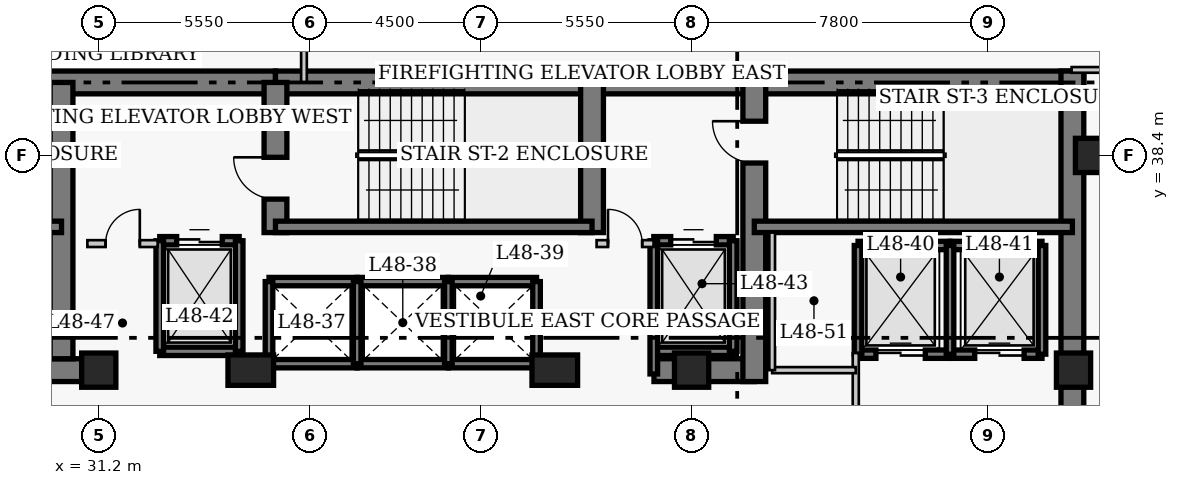
"""IFC4 building model, lengths in metres.
Left out: names, types, materials, properties, quantities, classifications, styles, units other than length and angle.
Written with IfcOpenShell. Run it as: python <this file> out.ifc"""

import sys

from ifc_helpers import new_model, si_unit, direction, frame, frame_2d, origin, origin_2d, place, context, subcontext, project, spatial, rectangle, extrude, element, fill, save


model = new_model("IFC4")
c1 = context("Model", 3, precision=1e-05, world=origin(), true_north=direction((0.0, 1.0)))
c2 = subcontext(c1, "Body", "Model", "MODEL_VIEW")
j1 = project(units=[si_unit("LENGTHUNIT", "METRE"), si_unit("PLANEANGLEUNIT", "RADIAN")], contexts=[c1])
p1 = place(None, origin())
s1 = spatial("IfcSite", under=j1, at=p1, CompositionType="ELEMENT")
p2 = place(p1, origin())
s2 = spatial("IfcBuilding", under=s1, at=p2, CompositionType="ELEMENT")
p3 = place(p2, frame((0.0, 0.0, 192.9)))
s3 = spatial("IfcBuildingStorey", under=s2, at=p3, CompositionType="ELEMENT", Elevation=192.9)
p4 = place(p3, frame((21.6, 40.32, 0.0), z_axis=(0.0, 0.0, 1.0), x_axis=(1.0, 0.0, 0.0)))
e1 = element("IfcWall", 1, at=p4, inside=s3, PredefinedType="SHEAR", context=c2, shape_type="SweptSolid", body=[
    extrude(rectangle(XDim=14.25, YDim=0.6, at=frame_2d((7.125, 0.0))), origin(), (0.0, 0.0, 1.0), 3.9),
])
p5 = place(p3, frame((35.85, 40.32, 0.0), z_axis=(0.0, 0.0, 1.0), x_axis=(1.0, 0.0, 0.0)))
e2 = element("IfcWall", 2, at=p5, inside=s3, PredefinedType="SHEAR", context=c2, shape_type="SweptSolid", body=[
    extrude(rectangle(XDim=12.6, YDim=0.6, at=frame_2d((6.3, 0.0))), origin(), (0.0, 0.0, 1.0), 3.9),
])
p6 = place(p3, frame((48.45, 40.32, 0.0), z_axis=(0.0, 0.0, 1.0), x_axis=(1.0, 0.0, 0.0)))
e3 = element("IfcWall", 3, at=p6, inside=s3, PredefinedType="SHEAR", context=c2, shape_type="SweptSolid", body=[
    extrude(rectangle(XDim=8.67, YDim=0.6, at=frame_2d((4.335, 0.0))), origin(), (0.0, 0.0, 1.0), 3.9),
])
p7 = place(p3, frame((56.82, 27.05, 0.0), z_axis=(0.0, 0.0, 1.0), x_axis=(0.0, 1.0, 0.0)))
e4 = element("IfcWall", 4, at=p7, inside=s3, PredefinedType="SHEAR", context=c2, shape_type="SweptSolid", body=[
    extrude(rectangle(XDim=13.57, YDim=0.6, at=frame_2d((6.785, 0.0))), origin(), (0.0, 0.0, 1.0), 3.9),
])
p8 = place(p3, frame((28.45, 32.75, 0.0), z_axis=(0.0, 0.0, 1.0), x_axis=(1.0, 0.0, 0.0)))
e5 = element("IfcWall", 5, at=p8, inside=s3, PredefinedType="SHEAR", context=c2, shape_type="SweptSolid", body=[
    extrude(rectangle(XDim=2.4, YDim=0.6, at=frame_2d((1.2, 0.0))), origin(), (0.0, 0.0, 1.0), 3.9),
])
p9 = place(p3, frame((45.81, 32.75, 0.0), z_axis=(0.0, 0.0, 1.0), x_axis=(1.0, 0.0, 0.0)))
e6 = element("IfcWall", 6, at=p9, inside=s3, PredefinedType="SHEAR", context=c2, shape_type="SweptSolid", body=[
    extrude(rectangle(XDim=2.64, YDim=0.6, at=frame_2d((1.32, 0.0))), origin(), (0.0, 0.0, 1.0), 3.9),
])
p10 = place(p3, frame((30.22, 33.05, 0.0), z_axis=(0.0, 0.0, 1.0), x_axis=(0.0, 1.0, 0.0)))
e7 = element("IfcWall", 7, at=p10, inside=s3, PredefinedType="SHEAR", context=c2, shape_type="SweptSolid", body=[
    extrude(rectangle(XDim=7.27, YDim=0.6, at=frame_2d((3.635, 0.0))), origin(), (0.0, 0.0, 1.0), 3.9),
])
p11 = place(p3, frame((35.85, 36.37, 0.0), z_axis=(0.0, 0.0, 1.0), x_axis=(0.0, 1.0, 0.0)))
e8 = element("IfcWall", 8, at=p11, inside=s3, PredefinedType="SHEAR", context=c2, shape_type="SweptSolid", body=[
    extrude(rectangle(XDim=3.95, YDim=0.6, at=frame_2d((1.975, 0.0))), origin(), (0.0, 0.0, 1.0), 3.9),
])
p12 = place(p11, frame((0.88, 0.0, 0.0)))
e9 = element("IfcOpeningElement", 9, at=p12, cuts=e8, PredefinedType="OPENING", context=c2, shape_type="SweptSolid", body=[
    extrude(rectangle(XDim=1.1, YDim=2.15, at=frame_2d((0.55, 1.075))), frame((0.0, 0.31, 0.0), z_axis=(0.0, -1.0, 0.0), x_axis=(1.0, 0.0, 0.0)), (0.0, 0.0, 1.0), 0.62),
])
p13 = place(p3, frame((44.18, 36.37, 0.0), z_axis=(0.0, 0.0, 1.0), x_axis=(0.0, 1.0, 0.0)))
e10 = element("IfcWall", 10, at=p13, inside=s3, PredefinedType="SHEAR", context=c2, shape_type="SweptSolid", body=[
    extrude(rectangle(XDim=3.95, YDim=0.6, at=frame_2d((1.975, 0.0))), origin(), (0.0, 0.0, 1.0), 3.9),
])
p14 = place(p3, frame((48.45, 32.45, 0.0), z_axis=(0.0, 0.0, 1.0), x_axis=(0.0, 1.0, 0.0)))
e11 = element("IfcWall", 11, at=p14, inside=s3, PredefinedType="SHEAR", context=c2, shape_type="SweptSolid", body=[
    extrude(rectangle(XDim=7.87, YDim=0.6, at=frame_2d((3.935, 0.0))), origin(), (0.0, 0.0, 1.0), 3.9),
])
p15 = place(p14, frame((5.75, 0.0, 0.0)))
e12 = element("IfcOpeningElement", 12, at=p15, cuts=e11, PredefinedType="OPENING", context=c2, shape_type="SweptSolid", body=[
    extrude(rectangle(XDim=1.1, YDim=2.15, at=frame_2d((0.55, 1.075))), frame((0.0, 0.31, 0.0), z_axis=(0.0, -1.0, 0.0), x_axis=(1.0, 0.0, 0.0)), (0.0, 0.0, 1.0), 0.62),
])
p16 = place(p3, frame((21.9, 36.52, 0.0), z_axis=(0.0, 0.0, 1.0), x_axis=(1.0, 0.0, 0.0)))
e13 = element("IfcWall", 13, at=p16, inside=s3, PredefinedType="SHEAR", context=c2, shape_type="SweptSolid", body=[
    extrude(rectangle(XDim=8.32, YDim=0.3, at=frame_2d((4.16, 0.0))), origin(), (0.0, 0.0, 1.0), 3.9),
])
p17 = place(p16, frame((0.9, 0.0, 0.0)))
e14 = element("IfcOpeningElement", 14, at=p17, cuts=e13, PredefinedType="OPENING", context=c2, shape_type="SweptSolid", body=[
    extrude(rectangle(XDim=1.1, YDim=2.15, at=frame_2d((0.55, 1.075))), frame((0.0, 0.16, 0.0), z_axis=(0.0, -1.0, 0.0), x_axis=(1.0, 0.0, 0.0)), (0.0, 0.0, 1.0), 0.32),
])
p18 = place(p3, frame((35.85, 36.52, 0.0), z_axis=(0.0, 0.0, 1.0), x_axis=(1.0, 0.0, 0.0)))
e15 = element("IfcWall", 15, at=p18, inside=s3, PredefinedType="SHEAR", context=c2, shape_type="SweptSolid", body=[
    extrude(rectangle(XDim=8.33, YDim=0.3, at=frame_2d((4.165, 0.0))), origin(), (0.0, 0.0, 1.0), 3.9),
])
p19 = place(p3, frame((48.45, 36.52, 0.0), z_axis=(0.0, 0.0, 1.0), x_axis=(1.0, 0.0, 0.0)))
e16 = element("IfcWall", 16, at=p19, inside=s3, PredefinedType="SHEAR", context=c2, shape_type="SweptSolid", body=[
    extrude(rectangle(XDim=8.37, YDim=0.3, at=frame_2d((4.185, 0.0))), origin(), (0.0, 0.0, 1.0), 3.9),
])
for number, where, z_axis, x_axis in (
    (17, (57.35, 38.4, 0.0), (0.0, 0.0, 1.0), (1.0, 0.0, 0.0)),
    (18, (31.2, 32.75, 0.0), (0.0, 0.0, 1.0), (1.0, 0.0, 0.0)),
):
    element("IfcColumn", number, at=place(p3, frame(where, z_axis=z_axis, x_axis=x_axis)), inside=s3, PredefinedType="COLUMN", context=c2, shape_type="SweptSolid", body=[
        extrude(rectangle(XDim=0.9, YDim=0.9, at=origin_2d()), origin(), (0.0, 0.0, 1.0), 3.9),
    ])
for number, where, z_axis, x_axis in (
    (19, (35.2, 32.75, 0.0), (0.0, 0.0, 1.0), (1.0, 0.0, 0.0)),
    (20, (43.2, 32.75, 0.0), (0.0, 0.0, 1.0), (1.0, 0.0, 0.0)),
):
    element("IfcColumn", number, at=place(p3, frame(where, z_axis=z_axis, x_axis=x_axis)), inside=s3, PredefinedType="COLUMN", context=c2, shape_type="SweptSolid", body=[
        extrude(rectangle(XDim=1.2, YDim=0.8, at=origin_2d()), origin(), (0.0, 0.0, 1.0), 3.9),
    ])
for number, where, z_axis, x_axis in (
    (21, (46.8, 32.75, 0.0), (0.0, 0.0, 1.0), (1.0, 0.0, 0.0)),
    (22, (56.85, 32.75, 0.0), (0.0, 0.0, 1.0), (1.0, 0.0, 0.0)),
):
    element("IfcColumn", number, at=place(p3, frame(where, z_axis=z_axis, x_axis=x_axis)), inside=s3, PredefinedType="COLUMN", context=c2, shape_type="SweptSolid", body=[
        extrude(rectangle(XDim=0.9, YDim=0.9, at=origin_2d()), origin(), (0.0, 0.0, 1.0), 3.9),
    ])
for number, where, z_axis, x_axis in (
    (23, (35.68, 35.08, 0.0), (0.0, 0.0, 1.0), (1.0, 0.0, 0.0)),
    (24, (35.68, 32.92, 0.0), (0.0, 0.0, 1.0), (1.0, 0.0, 0.0)),
):
    element("IfcWall", number, at=place(p3, frame(where, z_axis=z_axis, x_axis=x_axis)), inside=s3, PredefinedType="SHEAR", context=c2, shape_type="SweptSolid", body=[
        extrude(rectangle(XDim=2.32, YDim=0.22, at=frame_2d((1.16, 0.0))), origin(), (0.0, 0.0, 1.0), 3.9),
    ])
p20 = place(p3, frame((35.68, 32.92, 0.0), z_axis=(0.0, 0.0, 1.0), x_axis=(0.0, 1.0, 0.0)))
e25 = element("IfcWall", 25, at=p20, inside=s3, PredefinedType="SHEAR", context=c2, shape_type="SweptSolid", body=[
    extrude(rectangle(XDim=2.16, YDim=0.2, at=frame_2d((1.08, 0.0))), origin(), (0.0, 0.0, 1.0), 3.9),
])
for number, where, z_axis, x_axis in (
    (26, (38.0, 35.08, 0.0), (0.0, 0.0, 1.0), (1.0, 0.0, 0.0)),
    (27, (38.0, 32.92, 0.0), (0.0, 0.0, 1.0), (1.0, 0.0, 0.0)),
):
    element("IfcWall", number, at=place(p3, frame(where, z_axis=z_axis, x_axis=x_axis)), inside=s3, PredefinedType="SHEAR", context=c2, shape_type="SweptSolid", body=[
        extrude(rectangle(XDim=2.4, YDim=0.22, at=frame_2d((1.2, 0.0))), origin(), (0.0, 0.0, 1.0), 3.9),
    ])
p21 = place(p3, frame((38.0, 32.92, 0.0), z_axis=(0.0, 0.0, 1.0), x_axis=(0.0, 1.0, 0.0)))
e28 = element("IfcWall", 28, at=p21, inside=s3, PredefinedType="SHEAR", context=c2, shape_type="SweptSolid", body=[
    extrude(rectangle(XDim=2.16, YDim=0.2, at=frame_2d((1.08, 0.0))), origin(), (0.0, 0.0, 1.0), 3.9),
])
for number, where, z_axis, x_axis in (
    (29, (40.4, 35.08, 0.0), (0.0, 0.0, 1.0), (1.0, 0.0, 0.0)),
    (30, (40.4, 32.92, 0.0), (0.0, 0.0, 1.0), (1.0, 0.0, 0.0)),
):
    element("IfcWall", number, at=place(p3, frame(where, z_axis=z_axis, x_axis=x_axis)), inside=s3, PredefinedType="SHEAR", context=c2, shape_type="SweptSolid", body=[
        extrude(rectangle(XDim=2.32, YDim=0.22, at=frame_2d((1.16, 0.0))), origin(), (0.0, 0.0, 1.0), 3.9),
    ])
for number, where, z_axis, x_axis in (
    (31, (40.4, 32.92, 0.0), (0.0, 0.0, 1.0), (0.0, 1.0, 0.0)),
    (32, (42.72, 32.92, 0.0), (0.0, 0.0, 1.0), (0.0, 1.0, 0.0)),
):
    element("IfcWall", number, at=place(p3, frame(where, z_axis=z_axis, x_axis=x_axis)), inside=s3, PredefinedType="SHEAR", context=c2, shape_type="SweptSolid", body=[
        extrude(rectangle(XDim=2.16, YDim=0.2, at=frame_2d((1.08, 0.0))), origin(), (0.0, 0.0, 1.0), 3.9),
    ])
p22 = place(p3, frame((51.18, 36.03, 0.0), z_axis=(0.0, 0.0, 1.0), x_axis=(1.0, 0.0, 0.0)))
e33 = element("IfcWall", 33, at=p22, inside=s3, PredefinedType="SHEAR", context=c2, shape_type="SweptSolid", body=[
    extrude(rectangle(XDim=2.42, YDim=0.22, at=frame_2d((1.21, 0.0))), origin(), (0.0, 0.0, 1.0), 3.9),
])
p23 = place(p3, frame((51.18, 33.17, 0.0), z_axis=(0.0, 0.0, 1.0), x_axis=(1.0, 0.0, 0.0)))
e34 = element("IfcWall", 34, at=p23, inside=s3, PredefinedType="SHEAR", context=c2, shape_type="SweptSolid", body=[
    extrude(rectangle(XDim=2.42, YDim=0.22, at=frame_2d((1.21, 0.0))), origin(), (0.0, 0.0, 1.0), 3.9),
])
p24 = place(p23, frame((0.47, 0.0, 0.0)))
e35 = element("IfcOpeningElement", 35, at=p24, cuts=e34, PredefinedType="OPENING", context=c2, shape_type="SweptSolid", body=[
    extrude(rectangle(XDim=1.3, YDim=2.15, at=frame_2d((0.65, 1.075))), frame((0.0, 0.12, 0.0), z_axis=(0.0, -1.0, 0.0), x_axis=(1.0, 0.0, 0.0)), (0.0, 0.0, 1.0), 0.24),
])
p25 = place(p3, frame((51.18, 33.17, 0.0), z_axis=(0.0, 0.0, 1.0), x_axis=(0.0, 1.0, 0.0)))
e36 = element("IfcWall", 36, at=p25, inside=s3, PredefinedType="SHEAR", context=c2, shape_type="SweptSolid", body=[
    extrude(rectangle(XDim=2.86, YDim=0.2, at=frame_2d((1.43, 0.0))), origin(), (0.0, 0.0, 1.0), 3.9),
])
p26 = place(p3, frame((53.6, 36.03, 0.0), z_axis=(0.0, 0.0, 1.0), x_axis=(1.0, 0.0, 0.0)))
e37 = element("IfcWall", 37, at=p26, inside=s3, PredefinedType="SHEAR", context=c2, shape_type="SweptSolid", body=[
    extrude(rectangle(XDim=2.42, YDim=0.22, at=frame_2d((1.21, 0.0))), origin(), (0.0, 0.0, 1.0), 3.9),
])
p27 = place(p3, frame((53.6, 33.17, 0.0), z_axis=(0.0, 0.0, 1.0), x_axis=(1.0, 0.0, 0.0)))
e38 = element("IfcWall", 38, at=p27, inside=s3, PredefinedType="SHEAR", context=c2, shape_type="SweptSolid", body=[
    extrude(rectangle(XDim=2.42, YDim=0.22, at=frame_2d((1.21, 0.0))), origin(), (0.0, 0.0, 1.0), 3.9),
])
p28 = place(p27, frame((0.65, 0.0, 0.0)))
e39 = element("IfcOpeningElement", 39, at=p28, cuts=e38, PredefinedType="OPENING", context=c2, shape_type="SweptSolid", body=[
    extrude(rectangle(XDim=1.3, YDim=2.15, at=frame_2d((0.65, 1.075))), frame((0.0, 0.12, 0.0), z_axis=(0.0, -1.0, 0.0), x_axis=(1.0, 0.0, 0.0)), (0.0, 0.0, 1.0), 0.24),
])
for number, where, z_axis, x_axis in (
    (40, (53.6, 33.17, 0.0), (0.0, 0.0, 1.0), (0.0, 1.0, 0.0)),
    (41, (56.02, 33.17, 0.0), (0.0, 0.0, 1.0), (0.0, 1.0, 0.0)),
):
    element("IfcWall", number, at=place(p3, frame(where, z_axis=z_axis, x_axis=x_axis)), inside=s3, PredefinedType="SHEAR", context=c2, shape_type="SweptSolid", body=[
        extrude(rectangle(XDim=2.86, YDim=0.2, at=frame_2d((1.43, 0.0))), origin(), (0.0, 0.0, 1.0), 3.9),
    ])
p29 = place(p3, frame((32.805, 36.155, 0.0), z_axis=(0.0, 0.0, 1.0), x_axis=(1.0, 0.0, 0.0)))
e42 = element("IfcWall", 42, at=p29, inside=s3, PredefinedType="SHEAR", context=c2, shape_type="SweptSolid", body=[
    extrude(rectangle(XDim=2.09, YDim=0.22, at=frame_2d((1.045, 0.0))), origin(), (0.0, 0.0, 1.0), 3.9),
])
p30 = place(p29, frame((0.445, 0.0, 0.0)))
e43 = element("IfcOpeningElement", 43, at=p30, cuts=e42, PredefinedType="OPENING", context=c2, shape_type="SweptSolid", body=[
    extrude(rectangle(XDim=1.2, YDim=2.15, at=frame_2d((0.6, 1.075))), frame((0.0, 0.12, 0.0), z_axis=(0.0, -1.0, 0.0), x_axis=(1.0, 0.0, 0.0)), (0.0, 0.0, 1.0), 0.24),
])
p31 = place(p3, frame((32.805, 33.245, 0.0), z_axis=(0.0, 0.0, 1.0), x_axis=(1.0, 0.0, 0.0)))
e44 = element("IfcWall", 44, at=p31, inside=s3, PredefinedType="SHEAR", context=c2, shape_type="SweptSolid", body=[
    extrude(rectangle(XDim=2.09, YDim=0.22, at=frame_2d((1.045, 0.0))), origin(), (0.0, 0.0, 1.0), 3.9),
])
for number, where, z_axis, x_axis in (
    (45, (32.805, 33.245, 0.0), (0.0, 0.0, 1.0), (0.0, 1.0, 0.0)),
    (46, (34.895, 33.245, 0.0), (0.0, 0.0, 1.0), (0.0, 1.0, 0.0)),
):
    element("IfcWall", number, at=place(p3, frame(where, z_axis=z_axis, x_axis=x_axis)), inside=s3, PredefinedType="SHEAR", context=c2, shape_type="SweptSolid", body=[
        extrude(rectangle(XDim=2.91, YDim=0.2, at=frame_2d((1.455, 0.0))), origin(), (0.0, 0.0, 1.0), 3.9),
    ])
p32 = place(p3, frame((45.805, 36.155, 0.0), z_axis=(0.0, 0.0, 1.0), x_axis=(1.0, 0.0, 0.0)))
e47 = element("IfcWall", 47, at=p32, inside=s3, PredefinedType="SHEAR", context=c2, shape_type="SweptSolid", body=[
    extrude(rectangle(XDim=2.09, YDim=0.22, at=frame_2d((1.045, 0.0))), origin(), (0.0, 0.0, 1.0), 3.9),
])
p33 = place(p32, frame((0.445, 0.0, 0.0)))
e48 = element("IfcOpeningElement", 48, at=p33, cuts=e47, PredefinedType="OPENING", context=c2, shape_type="SweptSolid", body=[
    extrude(rectangle(XDim=1.2, YDim=2.15, at=frame_2d((0.6, 1.075))), frame((0.0, 0.12, 0.0), z_axis=(0.0, -1.0, 0.0), x_axis=(1.0, 0.0, 0.0)), (0.0, 0.0, 1.0), 0.24),
])
p34 = place(p3, frame((45.805, 33.245, 0.0), z_axis=(0.0, 0.0, 1.0), x_axis=(1.0, 0.0, 0.0)))
e49 = element("IfcWall", 49, at=p34, inside=s3, PredefinedType="SHEAR", context=c2, shape_type="SweptSolid", body=[
    extrude(rectangle(XDim=2.09, YDim=0.22, at=frame_2d((1.045, 0.0))), origin(), (0.0, 0.0, 1.0), 3.9),
])
p35 = place(p3, frame((45.805, 32.65, 0.0), z_axis=(0.0, 0.0, 1.0), x_axis=(0.0, 1.0, 0.0)))
e50 = element("IfcWall", 50, at=p35, inside=s3, PredefinedType="SHEAR", context=c2, shape_type="SweptSolid", body=[
    extrude(rectangle(XDim=3.505, YDim=0.2, at=frame_2d((1.752, 0.0))), origin(), (0.0, 0.0, 1.0), 3.9),
])
p36 = place(p3, frame((47.895, 33.245, 0.0), z_axis=(0.0, 0.0, 1.0), x_axis=(0.0, 1.0, 0.0)))
e51 = element("IfcWall", 51, at=p36, inside=s3, PredefinedType="SHEAR", context=c2, shape_type="SweptSolid", body=[
    extrude(rectangle(XDim=2.91, YDim=0.2, at=frame_2d((1.455, 0.0))), origin(), (0.0, 0.0, 1.0), 3.9),
])
p37 = place(p3, frame((30.9, 36.08, 0.0), z_axis=(0.0, 0.0, 1.0), x_axis=(1.0, 0.0, 0.0)))
e52 = element("IfcWall", 52, at=p37, inside=s3, PredefinedType="PARTITIONING", context=c2, shape_type="SweptSolid", body=[
    extrude(rectangle(XDim=1.85, YDim=0.18, at=frame_2d((0.925, 0.0))), origin(), (0.0, 0.0, 1.0), 3.65),
])
p38 = place(p37, frame((0.48, 0.0, 0.0)))
e53 = element("IfcOpeningElement", 53, at=p38, cuts=e52, PredefinedType="OPENING", context=c2, shape_type="SweptSolid", body=[
    extrude(rectangle(XDim=0.9, YDim=2.15, at=frame_2d((0.45, 1.075))), frame((0.0, 0.1, 0.0), z_axis=(0.0, -1.0, 0.0), x_axis=(1.0, 0.0, 0.0)), (0.0, 0.0, 1.0), 0.2),
])
p39 = place(p3, frame((44.3, 36.08, 0.0), z_axis=(0.0, 0.0, 1.0), x_axis=(1.0, 0.0, 0.0)))
e54 = element("IfcWall", 54, at=p39, inside=s3, PredefinedType="PARTITIONING", context=c2, shape_type="SweptSolid", body=[
    extrude(rectangle(XDim=1.5, YDim=0.18, at=frame_2d((0.75, 0.0))), origin(), (0.0, 0.0, 1.0), 3.65),
])
p40 = place(p39, frame((0.3, 0.0, 0.0)))
e55 = element("IfcOpeningElement", 55, at=p40, cuts=e54, PredefinedType="OPENING", context=c2, shape_type="SweptSolid", body=[
    extrude(rectangle(XDim=0.9, YDim=2.15, at=frame_2d((0.45, 1.075))), frame((0.0, 0.1, 0.0), z_axis=(0.0, -1.0, 0.0), x_axis=(1.0, 0.0, 0.0)), (0.0, 0.0, 1.0), 0.2),
])
p41 = place(p3, frame((51.12, 29.5, 0.0), z_axis=(0.0, 0.0, 1.0), x_axis=(0.0, 1.0, 0.0)))
e56 = element("IfcWall", 56, at=p41, inside=s3, PredefinedType="PARTITIONING", context=c2, shape_type="SweptSolid", body=[
    extrude(rectangle(XDim=3.7, YDim=0.16, at=frame_2d((1.85, 0.0))), origin(), (0.0, 0.0, 1.0), 3.65),
])
p42 = place(p41, frame((0.9, 0.0, 0.0)))
e57 = element("IfcOpeningElement", 57, at=p42, cuts=e56, PredefinedType="OPENING", context=c2, shape_type="SweptSolid", body=[
    extrude(rectangle(XDim=1.1, YDim=2.15, at=frame_2d((0.55, 1.075))), frame((0.0, 0.09, 0.0), z_axis=(0.0, -1.0, 0.0), x_axis=(1.0, 0.0, 0.0)), (0.0, 0.0, 1.0), 0.18),
])
p43 = place(p3, frame((48.92, 32.75, 0.0), z_axis=(0.0, 0.0, 1.0), x_axis=(1.0, 0.0, 0.0)))
e58 = element("IfcWall", 58, at=p43, inside=s3, PredefinedType="PARTITIONING", context=c2, shape_type="SweptSolid", body=[
    extrude(rectangle(XDim=2.2, YDim=0.16, at=frame_2d((1.1, 0.0))), origin(), (0.0, 0.0, 1.0), 3.65),
])
p44 = place(p3, frame((48.92, 32.75, 0.0), z_axis=(0.0, 0.0, 1.0), x_axis=(0.0, 1.0, 0.0)))
e59 = element("IfcWall", 59, at=p44, inside=s3, PredefinedType="PARTITIONING", context=c2, shape_type="SweptSolid", body=[
    extrude(rectangle(XDim=3.62, YDim=0.15, at=frame_2d((1.81, 0.0))), origin(), (0.0, 0.0, 1.0), 3.65),
])
p45 = place(p3, frame((56.8, 40.65, 0.0), z_axis=(0.0, 0.0, 1.0), x_axis=(1.0, 0.0, 0.0)))
e60 = element("IfcWall", 60, at=p45, inside=s3, PredefinedType="PARTITIONING", context=c2, shape_type="SweptSolid", body=[
    extrude(rectangle(XDim=4.21, YDim=0.15, at=frame_2d((2.105, 0.0))), origin(), (0.0, 0.0, 1.0), 3.65),
])
p46 = place(p45, frame((2.6, 0.0, 0.0)))
e61 = element("IfcOpeningElement", 61, at=p46, cuts=e60, PredefinedType="OPENING", context=c2, shape_type="SweptSolid", body=[
    extrude(rectangle(XDim=1.0, YDim=2.15, at=frame_2d((0.5, 1.075))), frame((0.0, 0.085, 0.0), z_axis=(0.0, -1.0, 0.0), x_axis=(1.0, 0.0, 0.0)), (0.0, 0.0, 1.0), 0.17),
])
p47 = place(p3, frame((36.6, 40.32, 0.0), z_axis=(0.0, 0.0, 1.0), x_axis=(0.0, 1.0, 0.0)))
e62 = element("IfcWall", 62, at=p47, inside=s3, PredefinedType="PARTITIONING", context=c2, shape_type="SweptSolid", body=[
    extrude(rectangle(XDim=2.345, YDim=0.15, at=frame_2d((1.172, 0.0))), origin(), (0.0, 0.0, 1.0), 3.65),
])
p48 = place(p24, origin())
e63 = element("IfcDoor", 63, at=p48, inside=s3, OperationType="DOUBLE_DOOR_SLIDING", PredefinedType="DOOR", context=c2, shape_type="SweptSolid", body=[
    extrude(rectangle(XDim=1.3, YDim=2.15, at=frame_2d((0.65, 1.075))), frame((0.0, 0.025, 0.0), z_axis=(0.0, -1.0, 0.0), x_axis=(1.0, 0.0, 0.0)), (0.0, 0.0, 1.0), 0.05),
])
fill(e35, e63)
p49 = place(p28, origin())
e64 = element("IfcDoor", 64, at=p49, inside=s3, OperationType="DOUBLE_DOOR_SLIDING", PredefinedType="DOOR", context=c2, shape_type="SweptSolid", body=[
    extrude(rectangle(XDim=1.3, YDim=2.15, at=frame_2d((0.65, 1.075))), frame((0.0, 0.025, 0.0), z_axis=(0.0, -1.0, 0.0), x_axis=(1.0, 0.0, 0.0)), (0.0, 0.0, 1.0), 0.05),
])
fill(e39, e64)
p50 = place(p30, origin())
e65 = element("IfcDoor", 65, at=p50, inside=s3, OperationType="DOUBLE_DOOR_SLIDING", PredefinedType="DOOR", context=c2, shape_type="SweptSolid", body=[
    extrude(rectangle(XDim=1.2, YDim=2.15, at=frame_2d((0.6, 1.075))), frame((0.0, 0.025, 0.0), z_axis=(0.0, -1.0, 0.0), x_axis=(1.0, 0.0, 0.0)), (0.0, 0.0, 1.0), 0.05),
])
fill(e43, e65)
p51 = place(p33, origin())
e66 = element("IfcDoor", 66, at=p51, inside=s3, OperationType="DOUBLE_DOOR_SLIDING", PredefinedType="DOOR", context=c2, shape_type="SweptSolid", body=[
    extrude(rectangle(XDim=1.2, YDim=2.15, at=frame_2d((0.6, 1.075))), frame((0.0, 0.025, 0.0), z_axis=(0.0, -1.0, 0.0), x_axis=(1.0, 0.0, 0.0)), (0.0, 0.0, 1.0), 0.05),
])
fill(e48, e66)
p52 = place(p38, origin())
e67 = element("IfcDoor", 67, at=p52, inside=s3, OperationType="SINGLE_SWING_RIGHT", PredefinedType="DOOR", context=c2, shape_type="SweptSolid", body=[
    extrude(rectangle(XDim=0.9, YDim=2.15, at=frame_2d((0.45, 1.075))), frame((0.0, 0.025, 0.0), z_axis=(0.0, -1.0, 0.0), x_axis=(1.0, 0.0, 0.0)), (0.0, 0.0, 1.0), 0.05),
])
fill(e53, e67)
p53 = place(p40, origin())
e68 = element("IfcDoor", 68, at=p53, inside=s3, OperationType="SINGLE_SWING_LEFT", PredefinedType="DOOR", context=c2, shape_type="SweptSolid", body=[
    extrude(rectangle(XDim=0.9, YDim=2.15, at=frame_2d((0.45, 1.075))), frame((0.0, 0.025, 0.0), z_axis=(0.0, -1.0, 0.0), x_axis=(1.0, 0.0, 0.0)), (0.0, 0.0, 1.0), 0.05),
])
fill(e55, e68)
p54 = place(p12, origin())
e69 = element("IfcDoor", 69, at=p54, inside=s3, OperationType="SINGLE_SWING_RIGHT", PredefinedType="DOOR", context=c2, shape_type="SweptSolid", body=[
    extrude(rectangle(XDim=1.1, YDim=2.15, at=frame_2d((0.55, 1.075))), frame((0.0, 0.025, 0.0), z_axis=(0.0, -1.0, 0.0), x_axis=(1.0, 0.0, 0.0)), (0.0, 0.0, 1.0), 0.05),
])
fill(e9, e69)
p55 = place(p15, origin())
e70 = element("IfcDoor", 70, at=p55, inside=s3, OperationType="SINGLE_SWING_RIGHT", PredefinedType="DOOR", context=c2, shape_type="SweptSolid", body=[
    extrude(rectangle(XDim=1.1, YDim=2.15, at=frame_2d((0.55, 1.075))), frame((0.0, 0.025, 0.0), z_axis=(0.0, -1.0, 0.0), x_axis=(1.0, 0.0, 0.0)), (0.0, 0.0, 1.0), 0.05),
])
fill(e12, e70)
save(model, sys.argv[1])
